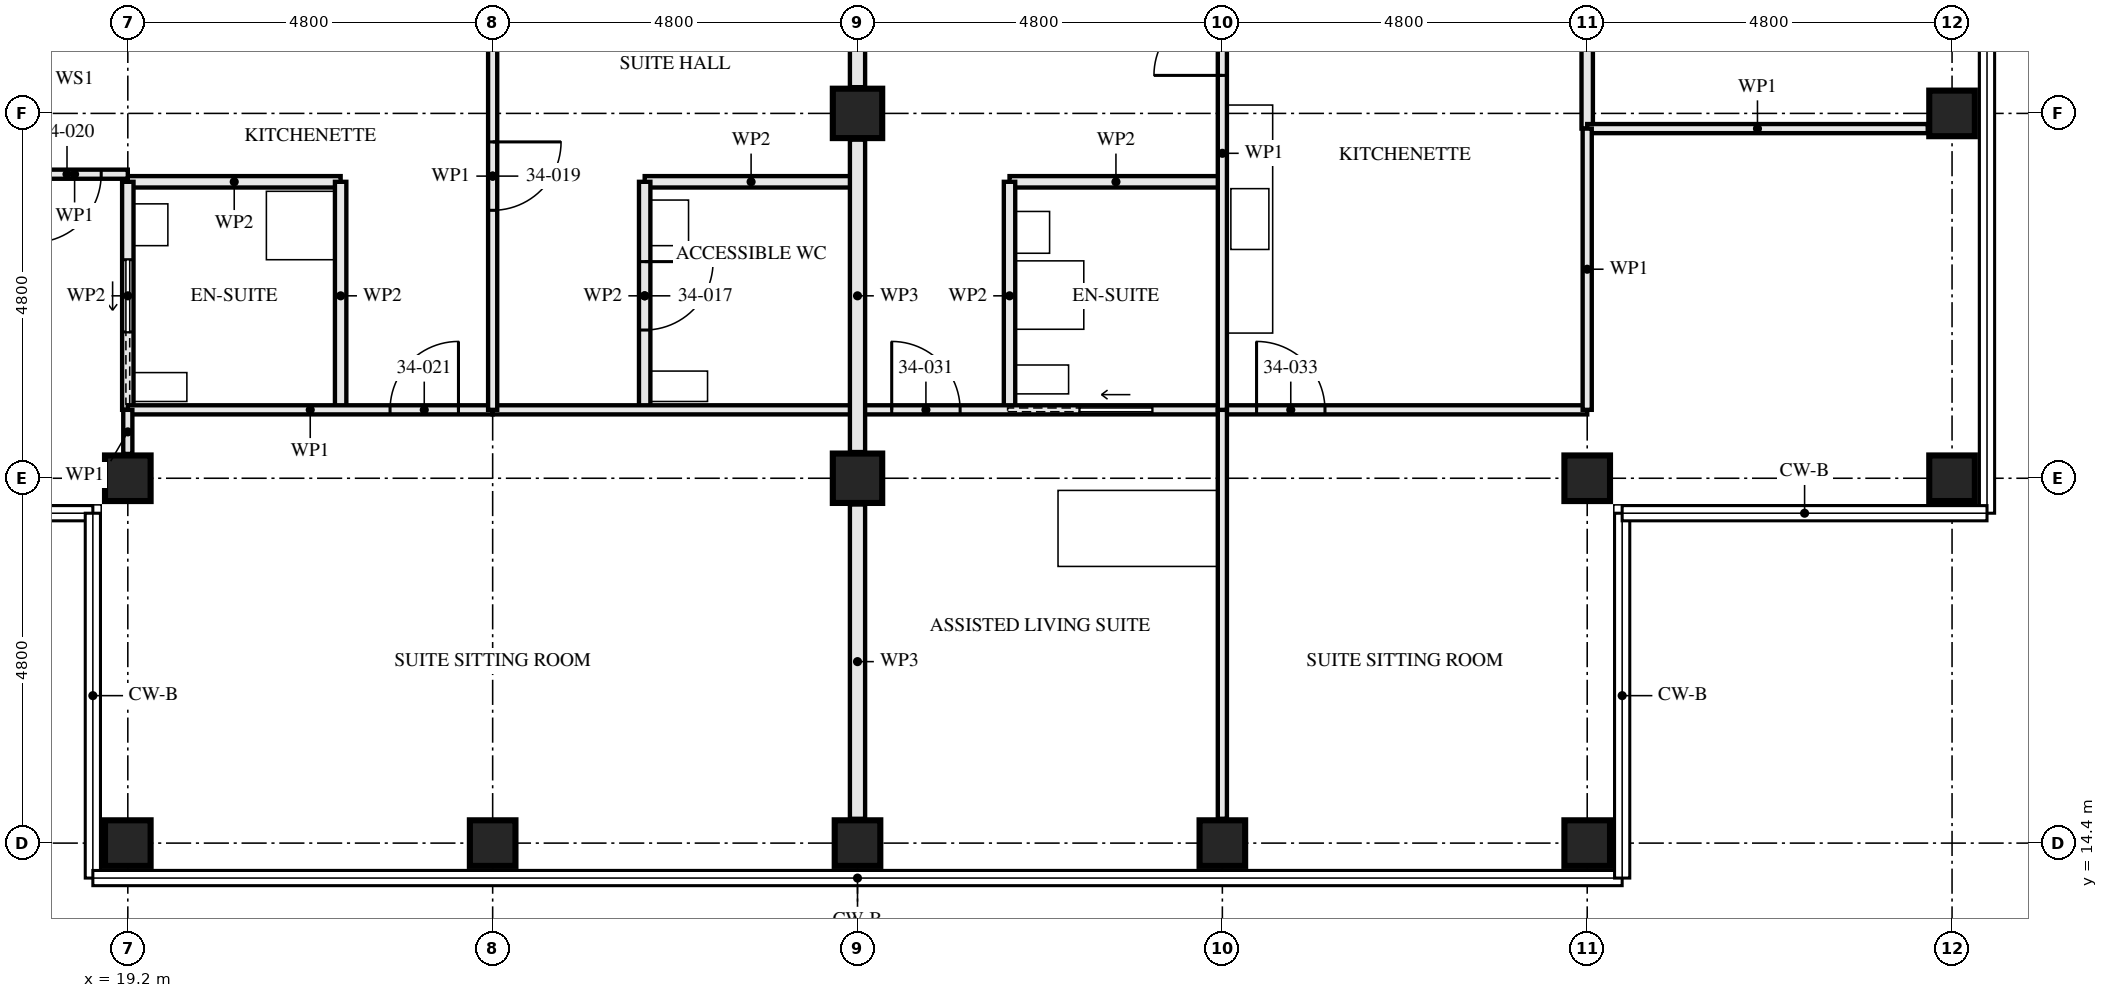
"""IFC4 building model, lengths in metres.
Left out: names, types, materials, properties, quantities, classifications, styles, units other than length and angle.
Written with IfcOpenShell. Run it as: python <this file> out.ifc"""

import sys

from ifc_helpers import new_model, si_unit, direction, frame, frame_2d, origin, origin_2d, place, context, subcontext, project, spatial, rectangle, hollow_rectangle, extrude, element, fill, save


model = new_model("IFC4")
c1 = context("Model", 3, precision=1e-05, world=origin(), true_north=direction((0.0, 1.0)))
c2 = subcontext(c1, "Body", "Model", "MODEL_VIEW")
j1 = project(units=[si_unit("LENGTHUNIT", "METRE"), si_unit("PLANEANGLEUNIT", "RADIAN")], contexts=[c1])
p1 = place(None, origin())
s1 = spatial("IfcSite", under=j1, at=p1, CompositionType="ELEMENT")
p2 = place(p1, origin())
s2 = spatial("IfcBuilding", under=s1, at=p2, CompositionType="ELEMENT")
p3 = place(p2, frame((0.0, 0.0, 126.0)))
s3 = spatial("IfcBuildingStorey", under=s2, at=p3, CompositionType="ELEMENT", Elevation=126.0)
for number, where, z_axis, x_axis in (
    (1, (19.2, 14.4, 0.0), (0.0, 0.0, 1.0), (0.0, 1.0, 0.0)),
    (2, (19.2, 19.2, 0.0), (0.0, 0.0, 1.0), (0.0, 1.0, 0.0)),
    (3, (24.0, 14.4, 0.0), (0.0, 0.0, 1.0), (0.0, 1.0, 0.0)),
    (4, (28.8, 14.4, 0.0), (0.0, 0.0, 1.0), (0.0, 1.0, 0.0)),
):
    element("IfcColumn", number, at=place(p3, frame(where, z_axis=z_axis, x_axis=x_axis)), inside=s3, PredefinedType="COLUMN", context=c2, shape_type="SweptSolid", body=[
        extrude(hollow_rectangle(XDim=0.6, YDim=0.6, WallThickness=0.08, at=origin_2d()), origin(), (0.0, 0.0, 1.0), 3.5),
    ])
for number, where, z_axis, x_axis in (
    (5, (28.8, 19.2, 0.0), (0.0, 0.0, 1.0), (1.0, 0.0, 0.0)),
    (6, (28.8, 24.0, 0.0), (0.0, 0.0, 1.0), (1.0, 0.0, 0.0)),
):
    element("IfcColumn", number, at=place(p3, frame(where, z_axis=z_axis, x_axis=x_axis)), inside=s3, PredefinedType="COLUMN", context=c2, shape_type="SweptSolid", body=[
        extrude(hollow_rectangle(XDim=0.65, YDim=0.65, WallThickness=0.05, at=origin_2d()), origin(), (0.0, 0.0, 1.0), 3.5),
    ])
for number, where, z_axis, x_axis in (
    (7, (33.6, 14.4, 0.0), (0.0, 0.0, 1.0), (0.0, 1.0, 0.0)),
    (8, (38.4, 14.4, 0.0), (0.0, 0.0, 1.0), (0.0, 1.0, 0.0)),
    (9, (38.4, 19.2, 0.0), (0.0, 0.0, 1.0), (0.0, 1.0, 0.0)),
    (10, (43.2, 19.2, 0.0), (0.0, 0.0, 1.0), (0.0, 1.0, 0.0)),
    (11, (43.2, 24.0, 0.0), (0.0, 0.0, 1.0), (1.0, 0.0, 0.0)),
):
    element("IfcColumn", number, at=place(p3, frame(where, z_axis=z_axis, x_axis=x_axis)), inside=s3, PredefinedType="COLUMN", context=c2, shape_type="SweptSolid", body=[
        extrude(hollow_rectangle(XDim=0.6, YDim=0.6, WallThickness=0.08, at=origin_2d()), origin(), (0.0, 0.0, 1.0), 3.5),
    ])
p4 = place(p3, frame((26.0, 20.1, 0.0), z_axis=(0.0, 0.0, 1.0), x_axis=(0.0, 1.0, 0.0)))
e12 = element("IfcWall", 12, at=p4, inside=s3, PredefinedType="PARTITIONING", context=c2, shape_type="SweptSolid", body=[
    extrude(rectangle(XDim=3.0, YDim=0.15, at=frame_2d((1.5, 0.0))), origin(), (0.0, 0.0, 1.0), 3.33),
])
p5 = place(p4, frame((1.05, 0.0, 0.0)))
e13 = element("IfcOpeningElement", 13, at=p5, cuts=e12, PredefinedType="OPENING", context=c2, shape_type="SweptSolid", body=[
    extrude(rectangle(XDim=0.9, YDim=2.1, at=frame_2d((0.45, 1.05))), frame((0.0, 0.085, 0.0), z_axis=(0.0, -1.0, 0.0), x_axis=(1.0, 0.0, 0.0)), (0.0, 0.0, 1.0), 0.171),
])
p6 = place(p3, frame((26.0, 23.1, 0.0), z_axis=(0.0, 0.0, 1.0), x_axis=(1.0, 0.0, 0.0)))
e14 = element("IfcWall", 14, at=p6, inside=s3, PredefinedType="PARTITIONING", context=c2, shape_type="SweptSolid", body=[
    extrude(rectangle(XDim=2.8, YDim=0.15, at=frame_2d((1.4, 0.0))), origin(), (0.0, 0.0, 1.0), 3.33),
])
p7 = place(p3, frame((19.2, 20.1, 0.0), z_axis=(0.0, 0.0, 1.0), x_axis=(0.0, 1.0, 0.0)))
e15 = element("IfcWall", 15, at=p7, inside=s3, PredefinedType="PARTITIONING", context=c2, shape_type="SweptSolid", body=[
    extrude(rectangle(XDim=3.0, YDim=0.15, at=frame_2d((1.5, 0.0))), origin(), (0.0, 0.0, 1.0), 2.55),
])
p8 = place(p7, frame((1.025, 0.0, 0.0)))
e16 = element("IfcOpeningElement", 16, at=p8, cuts=e15, PredefinedType="OPENING", context=c2, shape_type="SweptSolid", body=[
    extrude(rectangle(XDim=0.95, YDim=2.1, at=frame_2d((0.475, 1.05))), frame((0.0, 0.085, 0.0), z_axis=(0.0, -1.0, 0.0), x_axis=(1.0, 0.0, 0.0)), (0.0, 0.0, 1.0), 0.171),
])
p9 = place(p3, frame((22.0, 20.1, 0.0), z_axis=(0.0, 0.0, 1.0), x_axis=(0.0, 1.0, 0.0)))
e17 = element("IfcWall", 17, at=p9, inside=s3, PredefinedType="PARTITIONING", context=c2, shape_type="SweptSolid", body=[
    extrude(rectangle(XDim=3.0, YDim=0.15, at=frame_2d((1.5, 0.0))), origin(), (0.0, 0.0, 1.0), 3.33),
])
p10 = place(p3, frame((19.2, 23.1, 0.0), z_axis=(0.0, 0.0, 1.0), x_axis=(1.0, 0.0, 0.0)))
e18 = element("IfcWall", 18, at=p10, inside=s3, PredefinedType="PARTITIONING", context=c2, shape_type="SweptSolid", body=[
    extrude(rectangle(XDim=2.8, YDim=0.15, at=frame_2d((1.4, 0.0))), origin(), (0.0, 0.0, 1.0), 3.33),
])
p11 = place(p3, frame((24.0, 20.1, 0.0), z_axis=(0.0, 0.0, 1.0), x_axis=(0.0, 1.0, 0.0)))
e19 = element("IfcWall", 19, at=p11, inside=s3, PredefinedType="PARTITIONING", context=c2, shape_type="SweptSolid", body=[
    extrude(rectangle(XDim=6.15, YDim=0.12, at=frame_2d((3.075, 0.0))), origin(), (0.0, 0.0, 1.0), 2.55),
])
p12 = place(p11, frame((2.625, 0.0, 0.0)))
e20 = element("IfcOpeningElement", 20, at=p12, cuts=e19, PredefinedType="OPENING", context=c2, shape_type="SweptSolid", body=[
    extrude(rectangle(XDim=0.9, YDim=2.1, at=frame_2d((0.45, 1.05))), frame((0.0, 0.071, 0.0), z_axis=(0.0, -1.0, 0.0), x_axis=(1.0, 0.0, 0.0)), (0.0, 0.0, 1.0), 0.141),
])
p13 = place(p3, frame((17.8, 23.2, 0.0), z_axis=(0.0, 0.0, 1.0), x_axis=(1.0, 0.0, 0.0)))
e21 = element("IfcWall", 21, at=p13, inside=s3, PredefinedType="PARTITIONING", context=c2, shape_type="SweptSolid", body=[
    extrude(rectangle(XDim=1.4, YDim=0.12, at=frame_2d((0.7, 0.0))), origin(), (0.0, 0.0, 1.0), 3.33),
])
p14 = place(p13, frame((0.15, 0.0, 0.0)))
e22 = element("IfcOpeningElement", 22, at=p14, cuts=e21, PredefinedType="OPENING", context=c2, shape_type="SweptSolid", body=[
    extrude(rectangle(XDim=0.9, YDim=2.1, at=frame_2d((0.45, 1.05))), frame((0.0, 0.071, 0.0), z_axis=(0.0, -1.0, 0.0), x_axis=(1.0, 0.0, 0.0)), (0.0, 0.0, 1.0), 0.141),
])
p15 = place(p3, frame((19.2, 20.1, 0.0), z_axis=(0.0, 0.0, 1.0), x_axis=(1.0, 0.0, 0.0)))
e23 = element("IfcWall", 23, at=p15, inside=s3, PredefinedType="PARTITIONING", context=c2, shape_type="SweptSolid", body=[
    extrude(rectangle(XDim=4.8, YDim=0.12, at=frame_2d((2.4, 0.0))), origin(), (0.0, 0.0, 1.0), 3.33),
])
p16 = place(p15, frame((3.45, 0.0, 0.0)))
e24 = element("IfcOpeningElement", 24, at=p16, cuts=e23, PredefinedType="OPENING", context=c2, shape_type="SweptSolid", body=[
    extrude(rectangle(XDim=0.9, YDim=2.1, at=frame_2d((0.45, 1.05))), frame((0.0, 0.071, 0.0), z_axis=(0.0, -1.0, 0.0), x_axis=(1.0, 0.0, 0.0)), (0.0, 0.0, 1.0), 0.141),
])
p17 = place(p3, frame((24.0, 20.1, 0.0), z_axis=(0.0, 0.0, 1.0), x_axis=(1.0, 0.0, 0.0)))
e25 = element("IfcWall", 25, at=p17, inside=s3, PredefinedType="PARTITIONING", context=c2, shape_type="SweptSolid", body=[
    extrude(rectangle(XDim=4.8, YDim=0.12, at=frame_2d((2.4, 0.0))), origin(), (0.0, 0.0, 1.0), 3.33),
])
p18 = place(p3, frame((19.2, 19.52, 0.0), z_axis=(0.0, 0.0, 1.0), x_axis=(0.0, 1.0, 0.0)))
e26 = element("IfcWall", 26, at=p18, inside=s3, PredefinedType="PARTITIONING", context=c2, shape_type="SweptSolid", body=[
    extrude(rectangle(XDim=0.58, YDim=0.12, at=frame_2d((0.29, 0.0))), origin(), (0.0, 0.0, 1.0), 2.55),
])
p19 = place(p3, frame((30.8, 20.1, 0.0), z_axis=(0.0, 0.0, 1.0), x_axis=(0.0, 1.0, 0.0)))
e27 = element("IfcWall", 27, at=p19, inside=s3, PredefinedType="PARTITIONING", context=c2, shape_type="SweptSolid", body=[
    extrude(rectangle(XDim=3.0, YDim=0.15, at=frame_2d((1.5, 0.0))), origin(), (0.0, 0.0, 1.0), 3.33),
])
p20 = place(p3, frame((30.8, 23.1, 0.0), z_axis=(0.0, 0.0, 1.0), x_axis=(1.0, 0.0, 0.0)))
e28 = element("IfcWall", 28, at=p20, inside=s3, PredefinedType="PARTITIONING", context=c2, shape_type="SweptSolid", body=[
    extrude(rectangle(XDim=2.8, YDim=0.15, at=frame_2d((1.4, 0.0))), origin(), (0.0, 0.0, 1.0), 3.33),
])
p21 = place(p3, frame((38.4, 23.8, 0.0), z_axis=(0.0, 0.0, 1.0), x_axis=(0.0, 1.0, 0.0)))
e29 = element("IfcWall", 29, at=p21, inside=s3, PredefinedType="PARTITIONING", context=c2, shape_type="SweptSolid", body=[
    extrude(rectangle(XDim=3.0, YDim=0.15, at=frame_2d((1.5, 0.0))), origin(), (0.0, 0.0, 1.0), 2.55),
])
p22 = place(p21, frame((1.05, 0.0, 0.0)))
e30 = element("IfcOpeningElement", 30, at=p22, cuts=e29, PredefinedType="OPENING", context=c2, shape_type="SweptSolid", body=[
    extrude(rectangle(XDim=0.9, YDim=2.1, at=frame_2d((0.45, 1.05))), frame((0.0, 0.085, 0.0), z_axis=(0.0, -1.0, 0.0), x_axis=(1.0, 0.0, 0.0)), (0.0, 0.0, 1.0), 0.171),
])
p23 = place(p3, frame((33.6, 20.1, 0.0), z_axis=(0.0, 0.0, 1.0), x_axis=(0.0, 1.0, 0.0)))
e31 = element("IfcWall", 31, at=p23, inside=s3, PredefinedType="PARTITIONING", context=c2, shape_type="SweptSolid", body=[
    extrude(rectangle(XDim=6.75, YDim=0.12, at=frame_2d((3.375, 0.0))), origin(), (0.0, 0.0, 1.0), 2.55),
])
p24 = place(p23, frame((4.4, 0.0, 0.0)))
e32 = element("IfcOpeningElement", 32, at=p24, cuts=e31, PredefinedType="OPENING", context=c2, shape_type="SweptSolid", body=[
    extrude(rectangle(XDim=0.9, YDim=2.1, at=frame_2d((0.45, 1.05))), frame((0.0, 0.071, 0.0), z_axis=(0.0, -1.0, 0.0), x_axis=(1.0, 0.0, 0.0)), (0.0, 0.0, 1.0), 0.141),
])
p25 = place(p3, frame((28.8, 20.1, 0.0), z_axis=(0.0, 0.0, 1.0), x_axis=(1.0, 0.0, 0.0)))
e33 = element("IfcWall", 33, at=p25, inside=s3, PredefinedType="PARTITIONING", context=c2, shape_type="SweptSolid", body=[
    extrude(rectangle(XDim=4.8, YDim=0.12, at=frame_2d((2.4, 0.0))), origin(), (0.0, 0.0, 1.0), 3.33),
])
p26 = place(p25, frame((0.45, 0.0, 0.0)))
e34 = element("IfcOpeningElement", 34, at=p26, cuts=e33, PredefinedType="OPENING", context=c2, shape_type="SweptSolid", body=[
    extrude(rectangle(XDim=0.9, YDim=2.1, at=frame_2d((0.45, 1.05))), frame((0.0, 0.071, 0.0), z_axis=(0.0, -1.0, 0.0), x_axis=(1.0, 0.0, 0.0)), (0.0, 0.0, 1.0), 0.141),
])
p27 = place(p25, frame((2.925, 0.0, 0.0)))
e35 = element("IfcOpeningElement", 35, at=p27, cuts=e33, PredefinedType="OPENING", context=c2, shape_type="SweptSolid", body=[
    extrude(rectangle(XDim=0.95, YDim=2.1, at=frame_2d((0.475, 1.05))), frame((0.0, 0.071, 0.0), z_axis=(0.0, -1.0, 0.0), x_axis=(1.0, 0.0, 0.0)), (0.0, 0.0, 1.0), 0.141),
])
p28 = place(p3, frame((33.6, 20.1, 0.0), z_axis=(0.0, 0.0, 1.0), x_axis=(1.0, 0.0, 0.0)))
e36 = element("IfcWall", 36, at=p28, inside=s3, PredefinedType="PARTITIONING", context=c2, shape_type="SweptSolid", body=[
    extrude(rectangle(XDim=4.8, YDim=0.12, at=frame_2d((2.4, 0.0))), origin(), (0.0, 0.0, 1.0), 3.33),
])
p29 = place(p28, frame((0.45, 0.0, 0.0)))
e37 = element("IfcOpeningElement", 37, at=p29, cuts=e36, PredefinedType="OPENING", context=c2, shape_type="SweptSolid", body=[
    extrude(rectangle(XDim=0.9, YDim=2.1, at=frame_2d((0.45, 1.05))), frame((0.0, 0.071, 0.0), z_axis=(0.0, -1.0, 0.0), x_axis=(1.0, 0.0, 0.0)), (0.0, 0.0, 1.0), 0.141),
])
p30 = place(p3, frame((38.4, 23.8, 0.0), z_axis=(0.0, 0.0, 1.0), x_axis=(1.0, 0.0, 0.0)))
e38 = element("IfcWall", 38, at=p30, inside=s3, PredefinedType="PARTITIONING", context=c2, shape_type="SweptSolid", body=[
    extrude(rectangle(XDim=4.48, YDim=0.12, at=frame_2d((2.24, 0.0))), origin(), (0.0, 0.0, 1.0), 3.33),
])
p31 = place(p3, frame((33.6, 14.72, 0.0), z_axis=(0.0, 0.0, 1.0), x_axis=(0.0, 1.0, 0.0)))
e39 = element("IfcWall", 39, at=p31, inside=s3, PredefinedType="PARTITIONING", context=c2, shape_type="SweptSolid", body=[
    extrude(rectangle(XDim=5.38, YDim=0.12, at=frame_2d((2.69, 0.0))), origin(), (0.0, 0.0, 1.0), 2.55),
])
p32 = place(p3, frame((38.4, 20.1, 0.0), z_axis=(0.0, 0.0, 1.0), x_axis=(0.0, 1.0, 0.0)))
e40 = element("IfcWall", 40, at=p32, inside=s3, PredefinedType="PARTITIONING", context=c2, shape_type="SweptSolid", body=[
    extrude(rectangle(XDim=3.7, YDim=0.12, at=frame_2d((1.85, 0.0))), origin(), (0.0, 0.0, 1.0), 3.33),
])
p33 = place(p3, frame((28.8, 14.72, 0.0), z_axis=(0.0, 0.0, 1.0), x_axis=(0.0, 1.0, 0.0)))
e41 = element("IfcWall", 41, at=p33, inside=s3, PredefinedType="PARTITIONING", context=c2, shape_type="SweptSolid", body=[
    extrude(rectangle(XDim=4.135, YDim=0.2, at=frame_2d((2.067, 0.0))), origin(), (0.0, 0.0, 1.0), 2.32),
])
p34 = place(p3, frame((28.8, 19.545, 0.0), z_axis=(0.0, 0.0, 1.0), x_axis=(0.0, 1.0, 0.0)))
e42 = element("IfcWall", 42, at=p34, inside=s3, PredefinedType="PARTITIONING", context=c2, shape_type="SweptSolid", body=[
    extrude(rectangle(XDim=4.11, YDim=0.2, at=frame_2d((2.055, 0.0))), origin(), (0.0, 0.0, 1.0), 2.32),
])
p35 = place(p3, frame((28.8, 24.345, 0.0), z_axis=(0.0, 0.0, 1.0), x_axis=(0.0, 1.0, 0.0)))
e43 = element("IfcWall", 43, at=p35, inside=s3, PredefinedType="PARTITIONING", context=c2, shape_type="SweptSolid", body=[
    extrude(rectangle(XDim=2.555, YDim=0.2, at=frame_2d((1.277, 0.0))), origin(), (0.0, 0.0, 1.0), 2.32),
])
p36 = place(p5, frame((0.9, 0.0, 0.0), z_axis=(0.0, 0.0, 1.0), x_axis=(-1.0, 0.0, 0.0)))
e44 = element("IfcDoor", 44, at=p36, inside=s3, OperationType="SINGLE_SWING_RIGHT", PredefinedType="DOOR", context=c2, shape_type="SweptSolid", body=[
    extrude(rectangle(XDim=0.9, YDim=2.1, at=frame_2d((0.45, 1.05))), frame((0.0, 0.022, 0.0), z_axis=(0.0, -1.0, 0.0), x_axis=(1.0, 0.0, 0.0)), (0.0, 0.0, 1.0), 0.044),
])
fill(e13, e44)
p37 = place(p8, origin())
e45 = element("IfcDoor", 45, at=p37, inside=s3, OperationType="SLIDING_TO_RIGHT", PredefinedType="DOOR", context=c2, shape_type="SweptSolid", body=[
    extrude(rectangle(XDim=0.95, YDim=2.1, at=frame_2d((0.475, 1.05))), frame((0.0, 0.022, 0.0), z_axis=(0.0, -1.0, 0.0), x_axis=(1.0, 0.0, 0.0)), (0.0, 0.0, 1.0), 0.044),
])
fill(e16, e45)
p38 = place(p12, frame((0.9, 0.0, 0.0), z_axis=(0.0, 0.0, 1.0), x_axis=(-1.0, 0.0, 0.0)))
e46 = element("IfcDoor", 46, at=p38, inside=s3, OperationType="SINGLE_SWING_RIGHT", PredefinedType="DOOR", context=c2, shape_type="SweptSolid", body=[
    extrude(rectangle(XDim=0.9, YDim=2.1, at=frame_2d((0.45, 1.05))), frame((0.0, 0.022, 0.0), z_axis=(0.0, -1.0, 0.0), x_axis=(1.0, 0.0, 0.0)), (0.0, 0.0, 1.0), 0.044),
])
fill(e20, e46)
p39 = place(p14, frame((0.9, 0.0, 0.0), z_axis=(0.0, 0.0, 1.0), x_axis=(-1.0, 0.0, 0.0)))
e47 = element("IfcDoor", 47, at=p39, inside=s3, OperationType="SINGLE_SWING_LEFT", PredefinedType="DOOR", context=c2, shape_type="SweptSolid", body=[
    extrude(rectangle(XDim=0.9, YDim=2.1, at=frame_2d((0.45, 1.05))), frame((0.0, 0.022, 0.0), z_axis=(0.0, -1.0, 0.0), x_axis=(1.0, 0.0, 0.0)), (0.0, 0.0, 1.0), 0.044),
])
fill(e22, e47)
p40 = place(p16, origin())
e48 = element("IfcDoor", 48, at=p40, inside=s3, OperationType="SINGLE_SWING_LEFT", PredefinedType="DOOR", context=c2, shape_type="SweptSolid", body=[
    extrude(rectangle(XDim=0.9, YDim=2.1, at=frame_2d((0.45, 1.05))), frame((0.0, 0.022, 0.0), z_axis=(0.0, -1.0, 0.0), x_axis=(1.0, 0.0, 0.0)), (0.0, 0.0, 1.0), 0.044),
])
fill(e24, e48)
p41 = place(p24, origin())
e49 = element("IfcDoor", 49, at=p41, inside=s3, OperationType="SINGLE_SWING_RIGHT", PredefinedType="DOOR", context=c2, shape_type="SweptSolid", body=[
    extrude(rectangle(XDim=0.9, YDim=2.1, at=frame_2d((0.45, 1.05))), frame((0.0, 0.022, 0.0), z_axis=(0.0, -1.0, 0.0), x_axis=(1.0, 0.0, 0.0)), (0.0, 0.0, 1.0), 0.044),
])
fill(e32, e49)
p42 = place(p26, origin())
e50 = element("IfcDoor", 50, at=p42, inside=s3, OperationType="SINGLE_SWING_RIGHT", PredefinedType="DOOR", context=c2, shape_type="SweptSolid", body=[
    extrude(rectangle(XDim=0.9, YDim=2.1, at=frame_2d((0.45, 1.05))), frame((0.0, 0.022, 0.0), z_axis=(0.0, -1.0, 0.0), x_axis=(1.0, 0.0, 0.0)), (0.0, 0.0, 1.0), 0.044),
])
fill(e34, e50)
p43 = place(p27, origin())
e51 = element("IfcDoor", 51, at=p43, inside=s3, OperationType="SLIDING_TO_RIGHT", PredefinedType="DOOR", context=c2, shape_type="SweptSolid", body=[
    extrude(rectangle(XDim=0.95, YDim=2.1, at=frame_2d((0.475, 1.05))), frame((0.0, 0.022, 0.0), z_axis=(0.0, -1.0, 0.0), x_axis=(1.0, 0.0, 0.0)), (0.0, 0.0, 1.0), 0.044),
])
fill(e35, e51)
p44 = place(p29, origin())
e52 = element("IfcDoor", 52, at=p44, inside=s3, OperationType="SINGLE_SWING_RIGHT", PredefinedType="DOOR", context=c2, shape_type="SweptSolid", body=[
    extrude(rectangle(XDim=0.9, YDim=2.1, at=frame_2d((0.45, 1.05))), frame((0.0, 0.022, 0.0), z_axis=(0.0, -1.0, 0.0), x_axis=(1.0, 0.0, 0.0)), (0.0, 0.0, 1.0), 0.044),
])
fill(e37, e52)
save(model, sys.argv[1])
